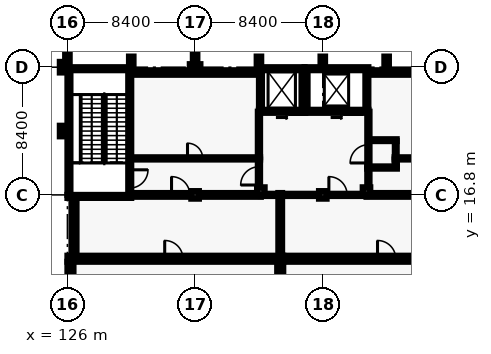
"""IFC4 building model, lengths in metres.
Left out: names, types, materials, properties, quantities, classifications, styles, units other than length and angle.
Written with IfcOpenShell. Run it as: python <this file> out.ifc"""

import sys

from ifc_helpers import new_model, si_unit, direction, frame, frame_2d, origin, origin_2d, place, context, subcontext, project, spatial, rectangle, extrude, element, fill, save


model = new_model("IFC4")
c1 = context("Model", 3, precision=1e-05, world=origin(), true_north=direction((0.0, 1.0)))
c2 = subcontext(c1, "Body", "Model", "MODEL_VIEW")
j1 = project(units=[si_unit("LENGTHUNIT", "METRE"), si_unit("PLANEANGLEUNIT", "RADIAN")], contexts=[c1])
p1 = place(None, origin())
s1 = spatial("IfcSite", under=j1, at=p1, CompositionType="ELEMENT")
p2 = place(p1, origin())
s2 = spatial("IfcBuilding", under=s1, at=p2, CompositionType="ELEMENT")
p3 = place(p2, frame((0.0, 0.0, 10.2)))
s3 = spatial("IfcBuildingStorey", under=s2, at=p3, CompositionType="ELEMENT", Elevation=10.2)
for number, where, z_axis, x_axis in (
    (1, (130.2, 16.7, 0.0), (0.0, 0.0, 1.0), (-1.0, 0.0, 0.0)),
    (2, (126.0, 25.1, 0.0), (0.0, 0.0, 1.0), (1.0, 0.0, 0.0)),
):
    element("IfcWall", number, at=place(p3, frame(where, z_axis=z_axis, x_axis=x_axis)), inside=s3, PredefinedType="SHEAR", context=c2, shape_type="SweptSolid", body=[
        extrude(rectangle(XDim=4.2, YDim=0.2, at=frame_2d((2.1, 0.0))), origin(), (0.0, 0.0, 1.0), 4.8),
    ])
p4 = place(p3, frame((126.1, 16.8, 0.0), z_axis=(0.0, 0.0, 1.0), x_axis=(0.0, 1.0, 0.0)))
e3 = element("IfcWall", 3, at=p4, inside=s3, PredefinedType="SHEAR", context=c2, shape_type="SweptSolid", body=[
    extrude(rectangle(XDim=8.2, YDim=0.2, at=frame_2d((4.1, 0.0))), origin(), (0.0, 0.0, 1.0), 4.8),
])
p5 = place(p3, frame((130.1, 25.0, 0.0), z_axis=(0.0, 0.0, 1.0), x_axis=(0.0, -1.0, 0.0)))
e4 = element("IfcWall", 4, at=p5, inside=s3, PredefinedType="SHEAR", context=c2, shape_type="SweptSolid", body=[
    extrude(rectangle(XDim=8.2, YDim=0.2, at=frame_2d((4.1, 0.0))), origin(), (0.0, 0.0, 1.0), 4.8),
])
p6 = place(p5, frame((6.55, 0.0, 0.0)))
e5 = element("IfcOpeningElement", 5, at=p6, cuts=e4, PredefinedType="OPENING", context=c2, shape_type="SweptSolid", body=[
    extrude(rectangle(XDim=1.2, YDim=2.1, at=frame_2d((0.6, 1.05))), frame((0.0, 0.11, 0.0), z_axis=(0.0, -1.0, 0.0), x_axis=(1.0, 0.0, 0.0)), (0.0, 0.0, 1.0), 0.22),
])
p7 = place(p3, frame((141.6, 22.3, 0.0), z_axis=(0.0, 0.0, 1.0), x_axis=(-1.0, 0.0, 0.0)))
e6 = element("IfcWall", 6, at=p7, inside=s3, PredefinedType="SHEAR", context=c2, shape_type="SweptSolid", body=[
    extrude(rectangle(XDim=3.0, YDim=0.2, at=frame_2d((1.5, 0.0))), origin(), (0.0, 0.0, 1.0), 4.8),
])
p8 = place(p7, frame((0.95, 0.0, 0.0)))
e7 = element("IfcOpeningElement", 7, at=p8, cuts=e6, PredefinedType="OPENING", context=c2, shape_type="SweptSolid", body=[
    extrude(rectangle(XDim=1.1, YDim=2.1, at=frame_2d((0.55, 1.05))), frame((0.0, 0.11, 0.0), z_axis=(0.0, -1.0, 0.0), x_axis=(1.0, 0.0, 0.0)), (0.0, 0.0, 1.0), 0.22),
])
p9 = place(p3, frame((138.6, 25.1, 0.0), z_axis=(0.0, 0.0, 1.0), x_axis=(1.0, 0.0, 0.0)))
e8 = element("IfcWall", 8, at=p9, inside=s3, PredefinedType="SHEAR", context=c2, shape_type="SweptSolid", body=[
    extrude(rectangle(XDim=3.0, YDim=0.2, at=frame_2d((1.5, 0.0))), origin(), (0.0, 0.0, 1.0), 4.8),
])
for number, where, z_axis, x_axis in (
    (9, (138.7, 22.4, 0.0), (0.0, 0.0, 1.0), (0.0, 1.0, 0.0)),
    (10, (141.5, 25.0, 0.0), (0.0, 0.0, 1.0), (0.0, -1.0, 0.0)),
):
    element("IfcWall", number, at=place(p3, frame(where, z_axis=z_axis, x_axis=x_axis)), inside=s3, PredefinedType="SHEAR", context=c2, shape_type="SweptSolid", body=[
        extrude(rectangle(XDim=2.6, YDim=0.2, at=frame_2d((1.3, 0.0))), origin(), (0.0, 0.0, 1.0), 4.8),
    ])
p10 = place(p3, frame((145.8, 22.3, 0.0), z_axis=(0.0, 0.0, 1.0), x_axis=(-1.0, 0.0, 0.0)))
e11 = element("IfcWall", 11, at=p10, inside=s3, PredefinedType="SHEAR", context=c2, shape_type="SweptSolid", body=[
    extrude(rectangle(XDim=4.2, YDim=0.2, at=frame_2d((2.1, 0.0))), origin(), (0.0, 0.0, 1.0), 4.8),
])
p11 = place(p10, frame((1.55, 0.0, 0.0)))
e12 = element("IfcOpeningElement", 12, at=p11, cuts=e11, PredefinedType="OPENING", context=c2, shape_type="SweptSolid", body=[
    extrude(rectangle(XDim=1.1, YDim=2.1, at=frame_2d((0.55, 1.05))), frame((0.0, 0.11, 0.0), z_axis=(0.0, -1.0, 0.0), x_axis=(1.0, 0.0, 0.0)), (0.0, 0.0, 1.0), 0.22),
])
p12 = place(p3, frame((141.6, 25.1, 0.0), z_axis=(0.0, 0.0, 1.0), x_axis=(1.0, 0.0, 0.0)))
e13 = element("IfcWall", 13, at=p12, inside=s3, PredefinedType="SHEAR", context=c2, shape_type="SweptSolid", body=[
    extrude(rectangle(XDim=4.2, YDim=0.2, at=frame_2d((2.1, 0.0))), origin(), (0.0, 0.0, 1.0), 4.8),
])
for number, where, z_axis, x_axis in (
    (14, (141.7, 22.4, 0.0), (0.0, 0.0, 1.0), (0.0, 1.0, 0.0)),
    (15, (145.7, 25.0, 0.0), (0.0, 0.0, 1.0), (0.0, -1.0, 0.0)),
):
    element("IfcWall", number, at=place(p3, frame(where, z_axis=z_axis, x_axis=x_axis)), inside=s3, PredefinedType="SHEAR", context=c2, shape_type="SweptSolid", body=[
        extrude(rectangle(XDim=2.6, YDim=0.2, at=frame_2d((1.3, 0.0))), origin(), (0.0, 0.0, 1.0), 4.8),
    ])
p13 = place(p3, frame((126.0, 12.6, 0.0), z_axis=(0.0, 0.0, 1.0), x_axis=(1.0, 0.0, 0.0)))
e16 = element("IfcWall", 16, at=p13, inside=s3, PredefinedType="SHEAR", context=c2, shape_type="SweptSolid", body=[
    extrude(rectangle(XDim=14.2, YDim=0.4, at=frame_2d((7.1, 0.0))), origin(), (0.0, 0.0, 1.0), 4.8),
])
p14 = place(p13, frame((6.4, 0.0, 0.0)))
e17 = element("IfcOpeningElement", 17, at=p14, cuts=e16, PredefinedType="OPENING", context=c2, shape_type="SweptSolid", body=[
    extrude(rectangle(XDim=1.2, YDim=2.1, at=frame_2d((0.6, 1.05))), frame((0.0, 0.21, 0.0), z_axis=(0.0, -1.0, 0.0), x_axis=(1.0, 0.0, 0.0)), (0.0, 0.0, 1.0), 0.42),
])
for number, where, z_axis, x_axis in (
    (18, (126.2, 0.4, 0.0), (0.0, 0.0, 1.0), (0.0, 1.0, 0.0)),
    (19, (140.0, 12.4, 0.0), (0.0, 0.0, 1.0), (0.0, -1.0, 0.0)),
):
    element("IfcWall", number, at=place(p3, frame(where, z_axis=z_axis, x_axis=x_axis)), inside=s3, PredefinedType="SHEAR", context=c2, shape_type="SweptSolid", body=[
        extrude(rectangle(XDim=12.0, YDim=0.4, at=frame_2d((6.0, 0.0))), origin(), (0.0, 0.0, 1.0), 4.8),
    ])
p15 = place(p3, frame((140.2, 12.6, 0.0), z_axis=(0.0, 0.0, 1.0), x_axis=(1.0, 0.0, 0.0)))
e20 = element("IfcWall", 20, at=p15, inside=s3, PredefinedType="SHEAR", context=c2, shape_type="SweptSolid", body=[
    extrude(rectangle(XDim=14.0, YDim=0.4, at=frame_2d((7.0, 0.0))), origin(), (0.0, 0.0, 1.0), 4.8),
])
p16 = place(p15, frame((6.2, 0.0, 0.0)))
e21 = element("IfcOpeningElement", 21, at=p16, cuts=e20, PredefinedType="OPENING", context=c2, shape_type="SweptSolid", body=[
    extrude(rectangle(XDim=1.2, YDim=2.1, at=frame_2d((0.6, 1.05))), frame((0.0, 0.21, 0.0), z_axis=(0.0, -1.0, 0.0), x_axis=(1.0, 0.0, 0.0)), (0.0, 0.0, 1.0), 0.42),
])
p17 = place(p3, frame((134.4, 16.8, 0.0), z_axis=(0.0, 0.0, 1.0), x_axis=(1.0, 0.0, 0.0)))
e22 = element("IfcColumn", 22, at=p17, inside=s3, PredefinedType="COLUMN", context=c2, shape_type="SweptSolid", body=[
    extrude(rectangle(XDim=0.5, YDim=0.5, at=origin_2d()), origin(), (0.0, 0.0, 1.0), 4.8),
])
p18 = place(p3, frame((134.4, 25.2, 0.0), z_axis=(0.0, 0.0, 1.0), x_axis=(1.0, 0.0, 0.0)))
e23 = element("IfcColumn", 23, at=p18, inside=s3, PredefinedType="COLUMN", context=c2, shape_type="SweptSolid", body=[
    extrude(rectangle(XDim=0.7, YDim=0.4, at=origin_2d()), origin(), (0.0, 0.0, 1.0), 4.8),
])
for number, where, z_axis, x_axis in (
    (24, (142.8, 16.8, 0.0), (0.0, 0.0, 1.0), (1.0, 0.0, 0.0)),
    (25, (138.725, 17.05, 0.0), (0.0, 0.0, 1.0), (1.0, 0.0, 0.0)),
    (26, (145.675, 17.05, 0.0), (0.0, 0.0, 1.0), (1.0, 0.0, 0.0)),
):
    element("IfcColumn", number, at=place(p3, frame(where, z_axis=z_axis, x_axis=x_axis)), inside=s3, PredefinedType="COLUMN", context=c2, shape_type="SweptSolid", body=[
        extrude(rectangle(XDim=0.5, YDim=0.5, at=origin_2d()), origin(), (0.0, 0.0, 1.0), 4.8),
    ])
p19 = place(p3, frame((130.2, 24.85, 0.0), z_axis=(0.0, 0.0, 1.0), x_axis=(1.0, 0.0, 0.0)))
e27 = element("IfcWall", 27, at=p19, inside=s3, PredefinedType="SOLIDWALL", context=c2, shape_type="SweptSolid", body=[
    extrude(rectangle(XDim=8.4, YDim=0.3, at=frame_2d((4.2, 0.0))), origin(), (0.0, 0.0, 1.0), 4.5),
])
p20 = place(p3, frame((145.8, 24.85, 0.0), z_axis=(0.0, 0.0, 1.0), x_axis=(1.0, 0.0, 0.0)))
e28 = element("IfcWall", 28, at=p20, inside=s3, PredefinedType="SOLIDWALL", context=c2, shape_type="SweptSolid", body=[
    extrude(rectangle(XDim=18.0, YDim=0.3, at=frame_2d((9.0, 0.0))), origin(), (0.0, 0.0, 1.0), 4.5),
])
p21 = place(p20, frame((2.7, 0.0, 1.5)))
e29 = element("IfcOpeningElement", 29, at=p21, cuts=e28, PredefinedType="OPENING", context=c2, shape_type="SweptSolid", body=[
    extrude(rectangle(XDim=1.2, YDim=0.9, at=frame_2d((0.6, 0.45))), frame((0.0, 0.16, 0.0), z_axis=(0.0, -1.0, 0.0), x_axis=(1.0, 0.0, 0.0)), (0.0, 0.0, 1.0), 0.32),
])
p22 = place(p20, frame((6.9, 0.0, 1.5)))
e30 = element("IfcOpeningElement", 30, at=p22, cuts=e28, PredefinedType="OPENING", context=c2, shape_type="SweptSolid", body=[
    extrude(rectangle(XDim=1.2, YDim=0.9, at=frame_2d((0.6, 0.45))), frame((0.0, 0.16, 0.0), z_axis=(0.0, -1.0, 0.0), x_axis=(1.0, 0.0, 0.0)), (0.0, 0.0, 1.0), 0.32),
])
for number, where, z_axis, x_axis in (
    (31, (126.0, 25.7, 0.0), (0.0, 0.0, 1.0), (1.0, 0.0, 0.0)),
    (32, (130.2, 25.55, 0.0), (0.0, 0.0, 1.0), (1.0, 0.0, 0.0)),
    (33, (134.4, 25.75, 0.0), (0.0, 0.0, 1.0), (1.0, 0.0, 0.0)),
    (34, (138.6, 25.55, 0.0), (0.0, 0.0, 1.0), (1.0, 0.0, 0.0)),
    (35, (142.8, 25.55, 0.0), (0.0, 0.0, 1.0), (1.0, 0.0, 0.0)),
    (36, (147.0, 25.55, 0.0), (0.0, 0.0, 1.0), (1.0, 0.0, 0.0)),
):
    element("IfcColumn", number, at=place(p3, frame(where, z_axis=z_axis, x_axis=x_axis)), inside=s3, PredefinedType="PILASTER", context=c2, shape_type="SweptSolid", body=[
        extrude(rectangle(XDim=0.3, YDim=0.7, at=origin_2d()), origin(), (0.0, 0.0, 1.0), 4.8),
    ])
p23 = place(p3, frame((126.45, 12.8, 0.0), z_axis=(0.0, 0.0, 1.0), x_axis=(0.0, 1.0, 0.0)))
e37 = element("IfcWall", 37, at=p23, inside=s3, PredefinedType="SOLIDWALL", context=c2, shape_type="SweptSolid", body=[
    extrude(rectangle(XDim=3.8, YDim=0.3, at=frame_2d((1.9, 0.0))), origin(), (0.0, 0.0, 1.0), 4.5),
])
for number, where, z_axis, x_axis in (
    (38, (125.65, 21.0, 0.0), (0.0, 0.0, 1.0), (0.0, 1.0, 0.0)),
    (39, (125.65, 25.2, 0.0), (0.0, 0.0, 1.0), (0.0, 1.0, 0.0)),
):
    element("IfcColumn", number, at=place(p3, frame(where, z_axis=z_axis, x_axis=x_axis)), inside=s3, PredefinedType="PILASTER", context=c2, shape_type="SweptSolid", body=[
        extrude(rectangle(XDim=0.3, YDim=0.7, at=origin_2d()), origin(), (0.0, 0.0, 1.0), 4.8),
    ])
p24 = place(p3, frame((130.2, 16.8, 0.0), z_axis=(0.0, 0.0, 1.0), x_axis=(1.0, 0.0, 0.0)))
e40 = element("IfcWall", 40, at=p24, inside=s3, PredefinedType="PARTITIONING", context=c2, shape_type="SweptSolid", body=[
    extrude(rectangle(XDim=8.525, YDim=0.25, at=frame_2d((4.263, 0.0))), origin(), (0.0, 0.0, 1.0), 3.8),
])
p25 = place(p24, frame((2.65, 0.0, 0.0)))
e41 = element("IfcOpeningElement", 41, at=p25, cuts=e40, PredefinedType="OPENING", context=c2, shape_type="SweptSolid", body=[
    extrude(rectangle(XDim=1.2, YDim=2.1, at=frame_2d((0.6, 1.05))), frame((0.0, 0.135, 0.0), z_axis=(0.0, -1.0, 0.0), x_axis=(1.0, 0.0, 0.0)), (0.0, 0.0, 1.0), 0.27),
])
p26 = place(p3, frame((145.675, 16.8, 0.0), z_axis=(0.0, 0.0, 1.0), x_axis=(1.0, 0.0, 0.0)))
e42 = element("IfcWall", 42, at=p26, inside=s3, PredefinedType="PARTITIONING", context=c2, shape_type="SweptSolid", body=[
    extrude(rectangle(XDim=18.125, YDim=0.25, at=frame_2d((9.062, 0.0))), origin(), (0.0, 0.0, 1.0), 3.8),
])
p27 = place(p26, frame((12.325, 0.0, 0.0)))
e43 = element("IfcOpeningElement", 43, at=p27, cuts=e42, PredefinedType="OPENING", context=c2, shape_type="SweptSolid", body=[
    extrude(rectangle(XDim=1.2, YDim=2.1, at=frame_2d((0.6, 1.05))), frame((0.0, 0.135, 0.0), z_axis=(0.0, -1.0, 0.0), x_axis=(1.0, 0.0, 0.0)), (0.0, 0.0, 1.0), 0.27),
])
p28 = place(p3, frame((140.0, 12.8, 0.0), z_axis=(0.0, 0.0, 1.0), x_axis=(0.0, 1.0, 0.0)))
e44 = element("IfcWall", 44, at=p28, inside=s3, PredefinedType="PARTITIONING", context=c2, shape_type="SweptSolid", body=[
    extrude(rectangle(XDim=4.125, YDim=0.25, at=frame_2d((2.062, 0.0))), origin(), (0.0, 0.0, 1.0), 3.8),
])
p29 = place(p3, frame((145.725, 18.6, 0.0), z_axis=(0.0, 0.0, 1.0), x_axis=(1.0, 0.0, 0.0)))
e45 = element("IfcWall", 45, at=p29, inside=s3, PredefinedType="PARTITIONING", context=c2, shape_type="SweptSolid", body=[
    extrude(rectangle(XDim=1.95, YDim=0.15, at=frame_2d((0.975, 0.0))), origin(), (0.0, 0.0, 1.0), 4.5),
])
p30 = place(p3, frame((130.2, 19.2, 0.0), z_axis=(0.0, 0.0, 1.0), x_axis=(1.0, 0.0, 0.0)))
e46 = element("IfcWall", 46, at=p30, inside=s3, PredefinedType="PARTITIONING", context=c2, shape_type="SweptSolid", body=[
    extrude(rectangle(XDim=8.475, YDim=0.15, at=frame_2d((4.237, 0.0))), origin(), (0.0, 0.0, 1.0), 3.8),
])
p31 = place(p30, frame((3.7, 0.0, 0.0)))
e47 = element("IfcOpeningElement", 47, at=p31, cuts=e46, PredefinedType="OPENING", context=c2, shape_type="SweptSolid", body=[
    extrude(rectangle(XDim=1.0, YDim=2.1, at=frame_2d((0.5, 1.05))), frame((0.0, 0.085, 0.0), z_axis=(0.0, -1.0, 0.0), x_axis=(1.0, 0.0, 0.0)), (0.0, 0.0, 1.0), 0.17),
])
p32 = place(p3, frame((147.525, 19.2, 0.0), z_axis=(0.0, 0.0, 1.0), x_axis=(1.0, 0.0, 0.0)))
e48 = element("IfcWall", 48, at=p32, inside=s3, PredefinedType="PARTITIONING", context=c2, shape_type="SweptSolid", body=[
    extrude(rectangle(XDim=16.275, YDim=0.15, at=frame_2d((8.137, 0.0))), origin(), (0.0, 0.0, 1.0), 3.8),
])
p33 = place(p32, frame((11.575, 0.0, 0.0)))
e49 = element("IfcOpeningElement", 49, at=p33, cuts=e48, PredefinedType="OPENING", context=c2, shape_type="SweptSolid", body=[
    extrude(rectangle(XDim=1.0, YDim=2.1, at=frame_2d((0.5, 1.05))), frame((0.0, 0.085, 0.0), z_axis=(0.0, -1.0, 0.0), x_axis=(1.0, 0.0, 0.0)), (0.0, 0.0, 1.0), 0.17),
])
p34 = place(p3, frame((138.725, 16.8, 0.0), z_axis=(0.0, 0.0, 1.0), x_axis=(1.0, 0.0, 0.0)))
e50 = element("IfcWall", 50, at=p34, inside=s3, PredefinedType="SOLIDWALL", context=c2, shape_type="SweptSolid", body=[
    extrude(rectangle(XDim=1.15, YDim=0.15, at=frame_2d((0.575, 0.0))), origin(), (0.0, 0.0, 1.0), 3.8),
])
p35 = place(p3, frame((140.125, 16.8, 0.0), z_axis=(0.0, 0.0, 1.0), x_axis=(1.0, 0.0, 0.0)))
e51 = element("IfcWall", 51, at=p35, inside=s3, PredefinedType="SOLIDWALL", context=c2, shape_type="SweptSolid", body=[
    extrude(rectangle(XDim=5.55, YDim=0.15, at=frame_2d((2.775, 0.0))), origin(), (0.0, 0.0, 1.0), 3.8),
])
p36 = place(p35, frame((3.075, 0.0, 0.0)))
e52 = element("IfcOpeningElement", 52, at=p36, cuts=e51, PredefinedType="OPENING", context=c2, shape_type="SweptSolid", body=[
    extrude(rectangle(XDim=1.2, YDim=2.1, at=frame_2d((0.6, 1.05))), frame((0.0, 0.085, 0.0), z_axis=(0.0, -1.0, 0.0), x_axis=(1.0, 0.0, 0.0)), (0.0, 0.0, 1.0), 0.17),
])
p37 = place(p3, frame((147.6, 18.675, 0.0), z_axis=(0.0, 0.0, 1.0), x_axis=(0.0, 1.0, 0.0)))
e53 = element("IfcWall", 53, at=p37, inside=s3, PredefinedType="PARTITIONING", context=c2, shape_type="SweptSolid", body=[
    extrude(rectangle(XDim=0.45, YDim=0.15, at=frame_2d((0.225, 0.0))), origin(), (0.0, 0.0, 1.0), 4.5),
])
p38 = place(p3, frame((138.6, 16.925, 0.0), z_axis=(0.0, 0.0, 1.0), x_axis=(0.0, 1.0, 0.0)))
e54 = element("IfcWall", 54, at=p38, inside=s3, PredefinedType="SOLIDWALL", context=c2, shape_type="SweptSolid", body=[
    extrude(rectangle(XDim=2.2, YDim=0.15, at=frame_2d((1.1, 0.0))), origin(), (0.0, 0.0, 1.0), 3.8),
])
p39 = place(p38, frame((0.525, 0.0, 0.0)))
e55 = element("IfcOpeningElement", 55, at=p39, cuts=e54, PredefinedType="OPENING", context=c2, shape_type="SweptSolid", body=[
    extrude(rectangle(XDim=1.2, YDim=2.1, at=frame_2d((0.6, 1.05))), frame((0.0, 0.085, 0.0), z_axis=(0.0, -1.0, 0.0), x_axis=(1.0, 0.0, 0.0)), (0.0, 0.0, 1.0), 0.17),
])
p40 = place(p3, frame((138.6, 19.275, 0.0), z_axis=(0.0, 0.0, 1.0), x_axis=(0.0, 1.0, 0.0)))
e56 = element("IfcWall", 56, at=p40, inside=s3, PredefinedType="SOLIDWALL", context=c2, shape_type="SweptSolid", body=[
    extrude(rectangle(XDim=3.0, YDim=0.15, at=frame_2d((1.5, 0.0))), origin(), (0.0, 0.0, 1.0), 4.5),
])
p41 = place(p3, frame((145.8, 16.925, 0.0), z_axis=(0.0, 0.0, 1.0), x_axis=(0.0, 1.0, 0.0)))
e57 = element("IfcWall", 57, at=p41, inside=s3, PredefinedType="SOLIDWALL", context=c2, shape_type="SweptSolid", body=[
    extrude(rectangle(XDim=1.6, YDim=0.15, at=frame_2d((0.8, 0.0))), origin(), (0.0, 0.0, 1.0), 3.8),
])
p42 = place(p3, frame((145.8, 18.675, 0.0), z_axis=(0.0, 0.0, 1.0), x_axis=(0.0, 1.0, 0.0)))
e58 = element("IfcWall", 58, at=p42, inside=s3, PredefinedType="SOLIDWALL", context=c2, shape_type="SweptSolid", body=[
    extrude(rectangle(XDim=3.6, YDim=0.15, at=frame_2d((1.8, 0.0))), origin(), (0.0, 0.0, 1.0), 4.5),
])
p43 = place(p42, frame((0.225, 0.0, 0.0)))
e59 = element("IfcOpeningElement", 59, at=p43, cuts=e58, PredefinedType="OPENING", context=c2, shape_type="SweptSolid", body=[
    extrude(rectangle(XDim=1.2, YDim=2.1, at=frame_2d((0.6, 1.05))), frame((0.0, 0.085, 0.0), z_axis=(0.0, -1.0, 0.0), x_axis=(1.0, 0.0, 0.0)), (0.0, 0.0, 1.0), 0.17),
])
p44 = place(p3, frame((145.875, 20.4, 0.0), z_axis=(0.0, 0.0, 1.0), x_axis=(1.0, 0.0, 0.0)))
e60 = element("IfcWall", 60, at=p44, inside=s3, PredefinedType="PARTITIONING", context=c2, shape_type="SweptSolid", body=[
    extrude(rectangle(XDim=1.788, YDim=0.125, at=frame_2d((0.894, 0.0))), origin(), (0.0, 0.0, 1.0), 4.5),
])
p45 = place(p3, frame((147.6, 19.275, 0.0), z_axis=(0.0, 0.0, 1.0), x_axis=(0.0, 1.0, 0.0)))
e61 = element("IfcWall", 61, at=p45, inside=s3, PredefinedType="PARTITIONING", context=c2, shape_type="SweptSolid", body=[
    extrude(rectangle(XDim=1.062, YDim=0.125, at=frame_2d((0.531, 0.0))), origin(), (0.0, 0.0, 1.0), 4.5),
])
p46 = place(p21, origin())
e62 = element("IfcWindow", 62, at=p46, inside=s3, PartitioningType="SINGLE_PANEL", PredefinedType="WINDOW", context=c2, shape_type="SweptSolid", body=[
    extrude(rectangle(XDim=1.2, YDim=0.9, at=frame_2d((0.6, 0.45))), frame((0.0, 0.03, 0.0), z_axis=(0.0, -1.0, 0.0), x_axis=(1.0, 0.0, 0.0)), (0.0, 0.0, 1.0), 0.06),
])
fill(e29, e62)
p47 = place(p8, origin())
e63 = element("IfcDoor", 63, at=p47, inside=s3, OperationType="SLIDING_TO_LEFT", PredefinedType="DOOR", context=c2, shape_type="SweptSolid", body=[
    extrude(rectangle(XDim=1.1, YDim=2.1, at=frame_2d((0.55, 1.05))), frame((0.0, 0.025, 0.0), z_axis=(0.0, -1.0, 0.0), x_axis=(1.0, 0.0, 0.0)), (0.0, 0.0, 1.0), 0.05),
])
fill(e7, e63)
p48 = place(p11, origin())
e64 = element("IfcDoor", 64, at=p48, inside=s3, OperationType="SLIDING_TO_LEFT", PredefinedType="DOOR", context=c2, shape_type="SweptSolid", body=[
    extrude(rectangle(XDim=1.1, YDim=2.1, at=frame_2d((0.55, 1.05))), frame((0.0, 0.025, 0.0), z_axis=(0.0, -1.0, 0.0), x_axis=(1.0, 0.0, 0.0)), (0.0, 0.0, 1.0), 0.05),
])
fill(e12, e64)
p49 = place(p6, origin())
e65 = element("IfcDoor", 65, at=p49, inside=s3, OperationType="SINGLE_SWING_LEFT", PredefinedType="DOOR", context=c2, shape_type="SweptSolid", body=[
    extrude(rectangle(XDim=1.2, YDim=2.1, at=frame_2d((0.6, 1.05))), frame((0.0, 0.025, 0.0), z_axis=(0.0, -1.0, 0.0), x_axis=(1.0, 0.0, 0.0)), (0.0, 0.0, 1.0), 0.05),
])
fill(e5, e65)
p50 = place(p25, origin())
e66 = element("IfcDoor", 66, at=p50, inside=s3, OperationType="SINGLE_SWING_LEFT", PredefinedType="DOOR", context=c2, shape_type="SweptSolid", body=[
    extrude(rectangle(XDim=1.2, YDim=2.1, at=frame_2d((0.6, 1.05))), frame((0.0, 0.025, 0.0), z_axis=(0.0, -1.0, 0.0), x_axis=(1.0, 0.0, 0.0)), (0.0, 0.0, 1.0), 0.05),
])
fill(e41, e66)
p51 = place(p39, origin())
e67 = element("IfcDoor", 67, at=p51, inside=s3, OperationType="SINGLE_SWING_RIGHT", PredefinedType="DOOR", context=c2, shape_type="SweptSolid", body=[
    extrude(rectangle(XDim=1.2, YDim=2.1, at=frame_2d((0.6, 1.05))), frame((0.0, 0.025, 0.0), z_axis=(0.0, -1.0, 0.0), x_axis=(1.0, 0.0, 0.0)), (0.0, 0.0, 1.0), 0.05),
])
fill(e55, e67)
p52 = place(p31, origin())
e68 = element("IfcDoor", 68, at=p52, inside=s3, OperationType="SINGLE_SWING_LEFT", PredefinedType="DOOR", context=c2, shape_type="SweptSolid", body=[
    extrude(rectangle(XDim=1.0, YDim=2.1, at=frame_2d((0.5, 1.05))), frame((0.0, 0.025, 0.0), z_axis=(0.0, -1.0, 0.0), x_axis=(1.0, 0.0, 0.0)), (0.0, 0.0, 1.0), 0.05),
])
fill(e47, e68)
p53 = place(p36, origin())
e69 = element("IfcDoor", 69, at=p53, inside=s3, OperationType="SINGLE_SWING_RIGHT", PredefinedType="DOOR", context=c2, shape_type="SweptSolid", body=[
    extrude(rectangle(XDim=1.2, YDim=2.1, at=frame_2d((0.6, 1.05))), frame((0.0, 0.025, 0.0), z_axis=(0.0, -1.0, 0.0), x_axis=(1.0, 0.0, 0.0)), (0.0, 0.0, 1.0), 0.05),
])
fill(e52, e69)
p54 = place(p43, origin())
e70 = element("IfcDoor", 70, at=p54, inside=s3, OperationType="SINGLE_SWING_RIGHT", PredefinedType="DOOR", context=c2, shape_type="SweptSolid", body=[
    extrude(rectangle(XDim=1.2, YDim=2.1, at=frame_2d((0.6, 1.05))), frame((0.0, 0.025, 0.0), z_axis=(0.0, -1.0, 0.0), x_axis=(1.0, 0.0, 0.0)), (0.0, 0.0, 1.0), 0.05),
])
fill(e59, e70)
p55 = place(p14, origin())
e71 = element("IfcDoor", 71, at=p55, inside=s3, OperationType="SINGLE_SWING_RIGHT", PredefinedType="DOOR", context=c2, shape_type="SweptSolid", body=[
    extrude(rectangle(XDim=1.2, YDim=2.1, at=frame_2d((0.6, 1.05))), frame((0.0, 0.025, 0.0), z_axis=(0.0, -1.0, 0.0), x_axis=(1.0, 0.0, 0.0)), (0.0, 0.0, 1.0), 0.05),
])
fill(e17, e71)
p56 = place(p16, origin())
e72 = element("IfcDoor", 72, at=p56, inside=s3, OperationType="SINGLE_SWING_RIGHT", PredefinedType="DOOR", context=c2, shape_type="SweptSolid", body=[
    extrude(rectangle(XDim=1.2, YDim=2.1, at=frame_2d((0.6, 1.05))), frame((0.0, 0.025, 0.0), z_axis=(0.0, -1.0, 0.0), x_axis=(1.0, 0.0, 0.0)), (0.0, 0.0, 1.0), 0.05),
])
fill(e21, e72)
save(model, sys.argv[1])
